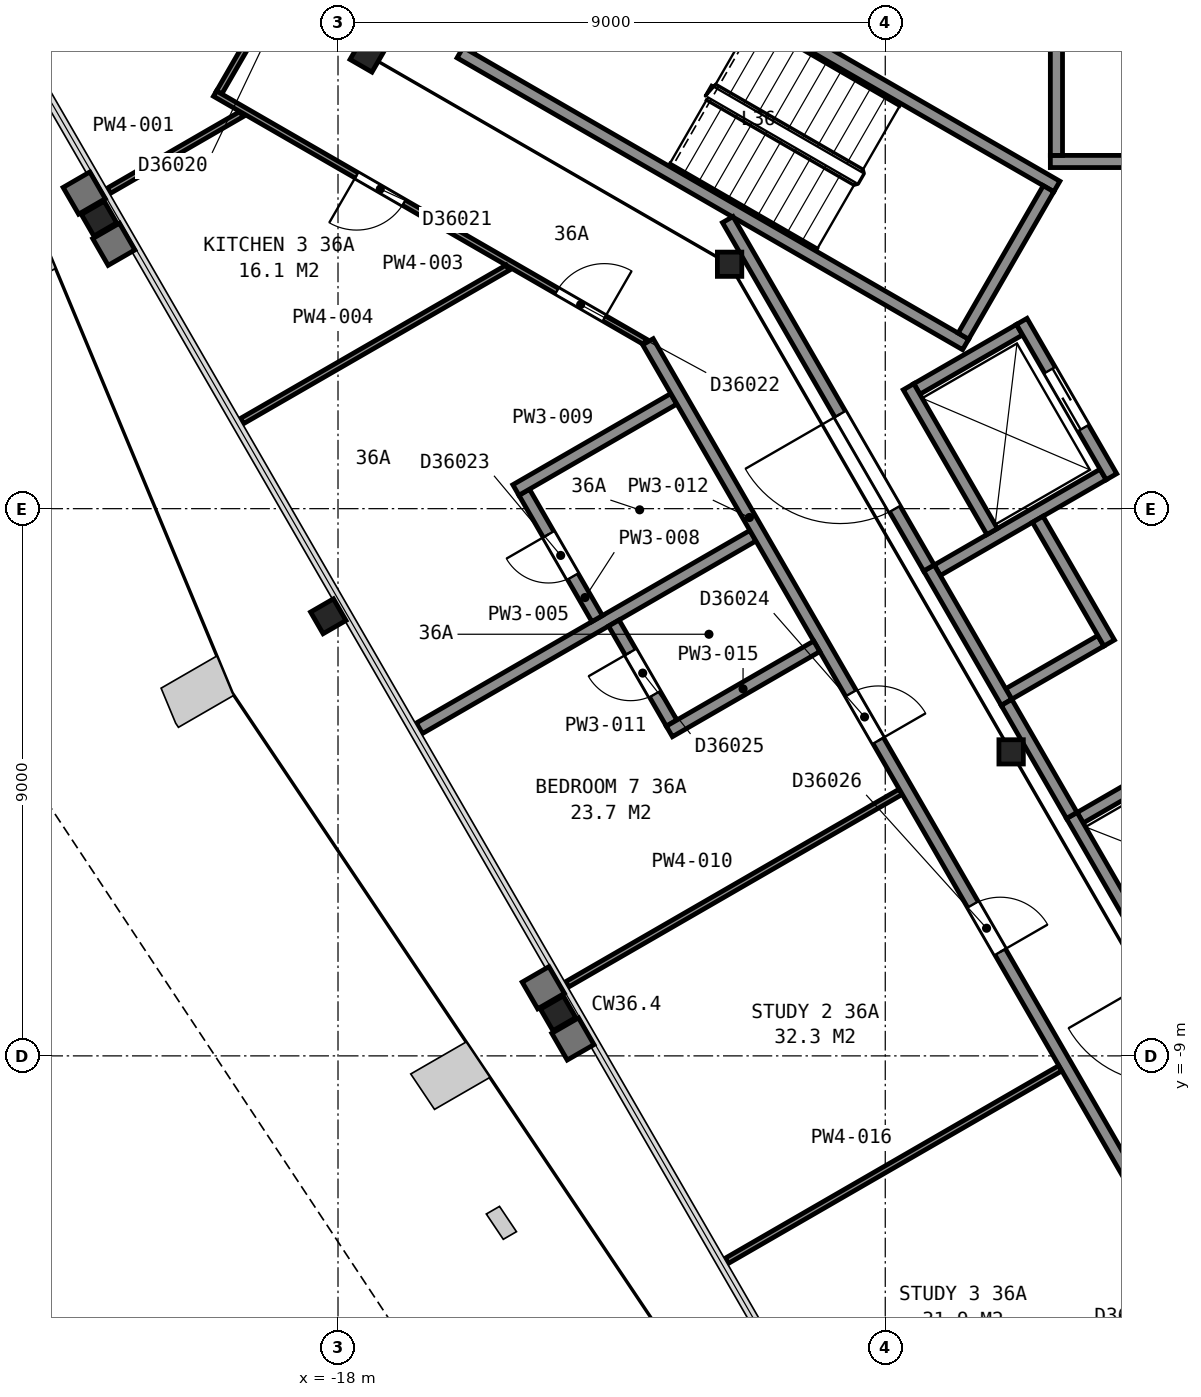
"""IFC4 building model, lengths in metres.
Left out: names, types, materials, properties, quantities, classifications, styles, units other than length and angle.
Written with IfcOpenShell. Run it as: python <this file> out.ifc"""

import sys

from ifc_helpers import new_model, si_unit, direction, frame, frame_2d, origin, origin_2d, place, context, subcontext, project, spatial, rectangle, i_section, extrude, element, fill, save


model = new_model("IFC4")
c1 = context("Model", 3, precision=1e-05, world=origin(), true_north=direction((0.0, 1.0)))
c2 = subcontext(c1, "Body", "Model", "MODEL_VIEW")
j1 = project(units=[si_unit("LENGTHUNIT", "METRE"), si_unit("PLANEANGLEUNIT", "RADIAN")], contexts=[c1])
p1 = place(None, origin())
s1 = spatial("IfcSite", under=j1, at=p1, CompositionType="ELEMENT")
p2 = place(p1, origin())
s2 = spatial("IfcBuilding", under=s1, at=p2, CompositionType="ELEMENT")
p3 = place(p2, frame((0.0, 0.0, 148.8)))
s3 = spatial("IfcBuildingStorey", under=s2, at=p3, CompositionType="ELEMENT", Elevation=148.8)
for number, where, z_axis, x_axis in (
    (1, (-21.93, 4.77, 0.0), (0.0, 0.0, 1.0), (-0.5, 0.866, 0.0)),
    (2, (-18.16, -1.77, 0.0), (0.0, 0.0, 1.0), (-0.5, 0.866, 0.0)),
    (3, (-14.38, -8.3, 0.0), (0.0, 0.0, 1.0), (-0.5, 0.866, 0.0)),
):
    element("IfcColumn", number, at=place(p3, frame(where, z_axis=z_axis, x_axis=x_axis)), inside=s3, PredefinedType="COLUMN", context=c2, shape_type="SweptSolid", body=[
        extrude(i_section(OverallWidth=0.411, OverallDepth=0.434, WebThickness=0.036, FlangeThickness=0.057, FilletRadius=0.015, at=origin_2d()), origin(), (0.0, 0.0, 1.0), 3.7),
    ])
p4 = place(p3, frame((-17.52, 7.46, 0.055), z_axis=(0.0, 0.0, 1.0), x_axis=(0.5, 0.866025403784, 0.0)))
e4 = element("IfcColumn", 4, at=p4, inside=s3, PredefinedType="COLUMN", context=c2, shape_type="SweptSolid", body=[
    extrude(i_section(OverallWidth=0.406, OverallDepth=0.417, WebThickness=0.03, FlangeThickness=0.048, FilletRadius=0.015, at=origin_2d()), origin(), (0.0, 0.0, 1.0), 3.645),
])
p5 = place(p3, frame((-11.56, 4.02, 0.065), z_axis=(0.0, 0.0, 1.0), x_axis=(1.0, 0.0, 0.0)))
e5 = element("IfcColumn", 5, at=p5, inside=s3, PredefinedType="COLUMN", context=c2, shape_type="SweptSolid", body=[
    extrude(i_section(OverallWidth=0.401, OverallDepth=0.399, WebThickness=0.025, FlangeThickness=0.04, FilletRadius=0.015, at=origin_2d()), origin(), (0.0, 0.0, 1.0), 3.635),
])
p6 = place(p3, frame((-6.93, -4.0, 0.04), z_axis=(0.0, 0.0, 1.0), x_axis=(1.0, 0.0, 0.0)))
e6 = element("IfcColumn", 6, at=p6, inside=s3, PredefinedType="COLUMN", context=c2, shape_type="SweptSolid", body=[
    extrude(i_section(OverallWidth=0.401, OverallDepth=0.399, WebThickness=0.025, FlangeThickness=0.04, FilletRadius=0.015, at=origin_2d()), origin(), (0.0, 0.0, 1.0), 3.66),
])
p7 = place(p3, frame((-14.455, 9.962, 0.0), z_axis=(0.0, 0.0, 1.0), x_axis=(-0.500049511043, -0.865996816683, 0.0)))
e7 = element("IfcWall", 7, at=p7, inside=s3, PredefinedType="PARTITIONING", context=c2, shape_type="SweptSolid", body=[
    extrude(rectangle(XDim=2.8, YDim=0.2, at=frame_2d((1.4, 0.0))), origin(), (0.0, 0.0, 1.0), 3.45),
])
p8 = place(p7, frame((0.85, 0.0, 0.0)))
e8 = element("IfcOpeningElement", 8, at=p8, cuts=e7, PredefinedType="OPENING", context=c2, shape_type="SweptSolid", body=[
    extrude(rectangle(XDim=1.1, YDim=2.1, at=frame_2d((0.55, 1.05))), frame((0.0, 0.11, 0.0), z_axis=(0.0, -1.0, 0.0), x_axis=(1.0, 0.0, 0.0)), (0.0, 0.0, 1.0), 0.22),
])
for number, where, z_axis, x_axis in (
    (9, (-7.678, 2.701, 0.0), (0.0, 0.0, 1.0), (-0.866, 0.5, 0.0)),
    (10, (-6.178, 5.299, 0.0), (0.0, 0.0, 1.0), (-0.866, 0.5, 0.0)),
):
    element("IfcWall", number, at=place(p3, frame(where, z_axis=z_axis, x_axis=x_axis)), inside=s3, PredefinedType="PARTITIONING", context=c2, shape_type="SweptSolid", body=[
        extrude(rectangle(XDim=9.6, YDim=0.2, at=frame_2d((4.8, 0.0))), origin(), (0.0, 0.0, 1.0), 3.45),
    ])
p9 = place(p3, frame((-6.315, 5.262, 0.0), z_axis=(0.0, 0.0, 1.0), x_axis=(-0.500049511043, -0.865996816683, 0.0)))
e11 = element("IfcWall", 11, at=p9, inside=s3, PredefinedType="PARTITIONING", context=c2, shape_type="SweptSolid", body=[
    extrude(rectangle(XDim=2.8, YDim=0.2, at=frame_2d((1.4, 0.0))), origin(), (0.0, 0.0, 1.0), 3.45),
])
p10 = place(p3, frame((-6.285, 5.71, 0.0), z_axis=(0.0, 0.0, 1.0), x_axis=(1.0, 0.0, 0.0)))
e12 = element("IfcWall", 12, at=p10, inside=s3, PredefinedType="PARTITIONING", context=c2, shape_type="SweptSolid", body=[
    extrude(rectangle(XDim=2.35, YDim=0.2, at=frame_2d((1.175, 0.0))), origin(), (0.0, 0.0, 1.0), 3.7),
])
for number, where, z_axis, x_axis in (
    (13, (-5.795, -5.083, 0.0), (0.0, 0.0, 1.0), (0.866, 0.5, 0.0)),
    (14, (-6.97, -3.048, 0.0), (0.0, 0.0, 1.0), (0.866, 0.5, 0.0)),
):
    element("IfcWall", number, at=place(p3, frame(where, z_axis=z_axis, x_axis=x_axis)), inside=s3, PredefinedType="PARTITIONING", context=c2, shape_type="SweptSolid", body=[
        extrude(rectangle(XDim=1.75, YDim=0.2, at=frame_2d((0.875, 0.0))), origin(), (0.0, 0.0, 1.0), 3.7),
    ])
p11 = place(p3, frame((-8.145, -1.013, 0.0), z_axis=(0.0, 0.0, 1.0), x_axis=(0.866016494683, 0.500015430699, 0.0)))
e15 = element("IfcWall", 15, at=p11, inside=s3, PredefinedType="PARTITIONING", context=c2, shape_type="SweptSolid", body=[
    extrude(rectangle(XDim=3.15, YDim=0.2, at=frame_2d((1.575, 0.0))), origin(), (0.0, 0.0, 1.0), 3.7),
])
p12 = place(p3, frame((-8.48, 1.969, 0.0), z_axis=(0.0, 0.0, 1.0), x_axis=(0.866000020948, 0.500043961785, 0.0)))
e16 = element("IfcWall", 16, at=p12, inside=s3, PredefinedType="PARTITIONING", context=c2, shape_type="SweptSolid", body=[
    extrude(rectangle(XDim=1.95, YDim=0.2, at=frame_2d((0.975, 0.0))), origin(), (0.0, 0.0, 1.0), 3.7),
])
p13 = place(p3, frame((-6.185, 5.81, 0.0), z_axis=(0.0, 0.0, 1.0), x_axis=(0.0, 1.0, 0.0)))
e17 = element("IfcWall", 17, at=p13, inside=s3, PredefinedType="PARTITIONING", context=c2, shape_type="SweptSolid", body=[
    extrude(rectangle(XDim=1.75, YDim=0.2, at=frame_2d((0.875, 0.0))), origin(), (0.0, 0.0, 1.0), 3.7),
])
p14 = place(p3, frame((-5.28, 0.525, 0.0), z_axis=(0.0, 0.0, 1.0), x_axis=(-0.500037662692, 0.866003658127, 0.0)))
e18 = element("IfcWall", 18, at=p14, inside=s3, PredefinedType="PARTITIONING", context=c2, shape_type="SweptSolid", body=[
    extrude(rectangle(XDim=2.95, YDim=0.2, at=frame_2d((1.475, 0.0))), origin(), (0.0, 0.0, 1.0), 3.7),
])
p15 = place(p14, frame((0.925, 0.0, 0.0)))
e19 = element("IfcOpeningElement", 19, at=p15, cuts=e18, PredefinedType="OPENING", context=c2, shape_type="SweptSolid", body=[
    extrude(rectangle(XDim=1.1, YDim=2.1, at=frame_2d((0.55, 1.05))), frame((0.0, 0.11, 0.0), z_axis=(0.0, -1.0, 0.0), x_axis=(1.0, 0.0, 0.0)), (0.0, 0.0, 1.0), 0.22),
])
p16 = place(p3, frame((-5.318, -2.21, 0.0), z_axis=(0.0, 0.0, 1.0), x_axis=(-0.499938297808, 0.866061024631, 0.0)))
e20 = element("IfcWall", 20, at=p16, inside=s3, PredefinedType="PARTITIONING", context=c2, shape_type="SweptSolid", body=[
    extrude(rectangle(XDim=2.35, YDim=0.2, at=frame_2d((1.175, 0.0))), origin(), (0.0, 0.0, 1.0), 3.7),
])
p17 = place(p3, frame((-7.242, -0.376, 0.0), z_axis=(0.0, 0.0, 1.0), x_axis=(-0.499996545922, 0.866027397988, 0.0)))
e21 = element("IfcWall", 21, at=p17, inside=s3, PredefinedType="PARTITIONING", context=c2, shape_type="SweptSolid", body=[
    extrude(rectangle(XDim=2.75, YDim=0.2, at=frame_2d((1.375, 0.0))), origin(), (0.0, 0.0, 1.0), 3.7),
])
for number, where, z_axis, x_axis in (
    (22, (-4.656, -7.255, 0.0), (0.0, 0.0, 1.0), (-0.5, 0.866, 0.0)),
    (23, (-7.006, -3.185, 0.0), (0.0, 0.0, 1.0), (-0.5, 0.866, 0.0)),
):
    element("IfcWall", number, at=place(p3, frame(where, z_axis=z_axis, x_axis=x_axis)), inside=s3, PredefinedType="PARTITIONING", context=c2, shape_type="SweptSolid", body=[
        extrude(rectangle(XDim=2.55, YDim=0.2, at=frame_2d((1.275, 0.0))), origin(), (0.0, 0.0, 1.0), 3.7),
    ])
p18 = place(p3, frame((-11.591, 4.755, 0.0), z_axis=(0.0, 0.0, 1.0), x_axis=(0.500043977787, -0.866000011708, 0.0)))
e24 = element("IfcWall", 24, at=p18, inside=s3, PredefinedType="PARTITIONING", context=c2, shape_type="SweptSolid", body=[
    extrude(rectangle(XDim=6.617, YDim=0.2, at=frame_2d((3.308, 0.0))), origin(), (0.0, 0.0, 1.0), 3.45),
])
p19 = place(p18, frame((3.695, 0.0, 0.0)))
e25 = element("IfcOpeningElement", 25, at=p19, cuts=e24, PredefinedType="OPENING", context=c2, shape_type="SweptSolid", body=[
    extrude(rectangle(XDim=1.8, YDim=2.1, at=frame_2d((0.9, 1.05))), frame((0.0, 0.11, 0.0), z_axis=(0.0, -1.0, 0.0), x_axis=(1.0, 0.0, 0.0)), (0.0, 0.0, 1.0), 0.22),
])
p20 = place(p3, frame((-7.005, -3.187, 0.0), z_axis=(0.0, 0.0, 1.0), x_axis=(0.499689606989, -0.866204535123, 0.0)))
e26 = element("IfcWall", 26, at=p20, inside=s3, PredefinedType="PARTITIONING", context=c2, shape_type="SweptSolid", body=[
    extrude(rectangle(XDim=2.145, YDim=0.2, at=frame_2d((1.072, 0.0))), origin(), (0.0, 0.0, 1.0), 3.45),
])
p21 = place(p3, frame((-21.767, 5.23, 0.0), z_axis=(0.0, 0.0, 1.0), x_axis=(0.865868809172, 0.50027113179, 0.0)))
e27 = element("IfcWall", 27, at=p21, inside=s3, PredefinedType="PARTITIONING", context=c2, shape_type="SweptSolid", body=[
    extrude(rectangle(XDim=2.516, YDim=0.1, at=frame_2d((1.258, 0.0))), origin(), (0.0, 0.0, 1.0), 2.713),
])
p22 = place(p3, frame((-19.955, 6.844, 0.0), z_axis=(0.0, 0.0, 1.0), x_axis=(0.500422653123, 0.865781247337, 0.0)))
e28 = element("IfcWall", 28, at=p22, inside=s3, PredefinedType="PARTITIONING", context=c2, shape_type="SweptSolid", body=[
    extrude(rectangle(XDim=8.047, YDim=0.1, at=frame_2d((4.024, 0.0))), origin(), (0.0, 0.0, 1.0), 2.713),
])
p23 = place(p22, frame((3.45, 0.0, 0.0)))
e29 = element("IfcOpeningElement", 29, at=p23, cuts=e28, PredefinedType="OPENING", context=c2, shape_type="SweptSolid", body=[
    extrude(rectangle(XDim=1.2, YDim=2.1, at=frame_2d((0.6, 1.05))), frame((0.0, 0.06, 0.0), z_axis=(0.0, -1.0, 0.0), x_axis=(1.0, 0.0, 0.0)), (0.0, 0.0, 1.0), 0.12),
])
p24 = place(p3, frame((-12.952, 2.744, 0.0), z_axis=(0.0, 0.0, 1.0), x_axis=(-0.86608949446, 0.499888975259, 0.0)))
e30 = element("IfcWall", 30, at=p24, inside=s3, PredefinedType="PARTITIONING", context=c2, shape_type="SweptSolid", body=[
    extrude(rectangle(XDim=8.165, YDim=0.1, at=frame_2d((4.083, 0.0))), origin(), (0.0, 0.0, 1.0), 2.713),
])
p25 = place(p24, frame((4.576, 0.0, 0.0)))
e31 = element("IfcOpeningElement", 31, at=p25, cuts=e30, PredefinedType="OPENING", context=c2, shape_type="SweptSolid", body=[
    extrude(rectangle(XDim=0.9, YDim=2.1, at=frame_2d((0.45, 1.05))), frame((0.0, 0.06, 0.0), z_axis=(0.0, -1.0, 0.0), x_axis=(1.0, 0.0, 0.0)), (0.0, 0.0, 1.0), 0.12),
])
p26 = place(p24, frame((0.772, 0.0, 0.0)))
e32 = element("IfcOpeningElement", 32, at=p26, cuts=e30, PredefinedType="OPENING", context=c2, shape_type="SweptSolid", body=[
    extrude(rectangle(XDim=0.9, YDim=2.1, at=frame_2d((0.45, 1.05))), frame((0.0, 0.06, 0.0), z_axis=(0.0, -1.0, 0.0), x_axis=(1.0, 0.0, 0.0)), (0.0, 0.0, 1.0), 0.12),
])
p27 = place(p3, frame((-19.579, 1.441, 0.0), z_axis=(0.0, 0.0, 1.0), x_axis=(0.866033235887, 0.499986434155, 0.0)))
e33 = element("IfcWall", 33, at=p27, inside=s3, PredefinedType="PARTITIONING", context=c2, shape_type="SweptSolid", body=[
    extrude(rectangle(XDim=5.044, YDim=0.1, at=frame_2d((2.522, 0.0))), origin(), (0.0, 0.0, 1.0), 2.713),
])
p28 = place(p3, frame((-16.662, -3.612, 0.0), z_axis=(0.0, 0.0, 1.0), x_axis=(0.866030886774, 0.499990503064, 0.0)))
e34 = element("IfcWall", 34, at=p28, inside=s3, PredefinedType="PARTITIONING", context=c2, shape_type="SweptSolid", body=[
    extrude(rectangle(XDim=6.333, YDim=0.2, at=frame_2d((3.167, 0.0))), origin(), (0.0, 0.0, 1.0), 2.713),
])
p29 = place(p3, frame((-14.938, 0.271, 0.0), z_axis=(0.0, 0.0, 1.0), x_axis=(0.499913221443, -0.866075499611, 0.0)))
e35 = element("IfcWall", 35, at=p29, inside=s3, PredefinedType="PARTITIONING", context=c2, shape_type="SweptSolid", body=[
    extrude(rectangle(XDim=2.4, YDim=0.2, at=frame_2d((1.2, 0.0))), origin(), (0.0, 0.0, 1.0), 2.713),
])
p30 = place(p29, frame((0.8, 0.0, 0.0)))
e36 = element("IfcOpeningElement", 36, at=p30, cuts=e35, PredefinedType="OPENING", context=c2, shape_type="SweptSolid", body=[
    extrude(rectangle(XDim=0.8, YDim=2.1, at=frame_2d((0.4, 1.05))), frame((0.0, 0.11, 0.0), z_axis=(0.0, -1.0, 0.0), x_axis=(1.0, 0.0, 0.0)), (0.0, 0.0, 1.0), 0.22),
])
p31 = place(p3, frame((-15.075, 0.307, 0.0), z_axis=(0.0, 0.0, 1.0), x_axis=(0.866134024916, 0.499811815469, 0.0)))
e37 = element("IfcWall", 37, at=p31, inside=s3, PredefinedType="PARTITIONING", context=c2, shape_type="SweptSolid", body=[
    extrude(rectangle(XDim=2.996, YDim=0.2, at=frame_2d((1.498, 0.0))), origin(), (0.0, 0.0, 1.0), 2.713),
])
p32 = place(p3, frame((-14.23, -7.823, 0.0), z_axis=(0.0, 0.0, 1.0), x_axis=(0.866021249958, 0.50000719457, 0.0)))
e38 = element("IfcWall", 38, at=p32, inside=s3, PredefinedType="PARTITIONING", context=c2, shape_type="SweptSolid", body=[
    extrude(rectangle(XDim=6.333, YDim=0.1, at=frame_2d((3.167, 0.0))), origin(), (0.0, 0.0, 1.0), 2.713),
])
p33 = place(p3, frame((-13.464, -1.882, 0.0), z_axis=(0.0, 0.0, 1.0), x_axis=(0.500007885066, -0.866020851292, 0.0)))
e39 = element("IfcWall", 39, at=p33, inside=s3, PredefinedType="PARTITIONING", context=c2, shape_type="SweptSolid", body=[
    extrude(rectangle(XDim=1.9, YDim=0.2, at=frame_2d((0.95, 0.0))), origin(), (0.0, 0.0, 1.0), 2.713),
])
p34 = place(p33, frame((0.55, 0.0, 0.0)))
e40 = element("IfcOpeningElement", 40, at=p34, cuts=e39, PredefinedType="OPENING", context=c2, shape_type="SweptSolid", body=[
    extrude(rectangle(XDim=0.8, YDim=2.1, at=frame_2d((0.4, 1.05))), frame((0.0, 0.11, 0.0), z_axis=(0.0, -1.0, 0.0), x_axis=(1.0, 0.0, 0.0)), (0.0, 0.0, 1.0), 0.22),
])
p35 = place(p3, frame((-4.075, -12.545, 0.0), z_axis=(0.0, 0.0, 1.0), x_axis=(-0.499999743747, 0.866025551732, 0.0)))
e41 = element("IfcWall", 41, at=p35, inside=s3, PredefinedType="PARTITIONING", context=c2, shape_type="SweptSolid", body=[
    extrude(rectangle(XDim=17.656, YDim=0.2, at=frame_2d((8.828, 0.0))), origin(), (0.0, 0.0, 1.0), 2.713),
])
p36 = place(p35, frame((10.08, 0.0, 0.0)))
e42 = element("IfcOpeningElement", 42, at=p36, cuts=e41, PredefinedType="OPENING", context=c2, shape_type="SweptSolid", body=[
    extrude(rectangle(XDim=0.9, YDim=2.1, at=frame_2d((0.45, 1.05))), frame((0.0, 0.11, 0.0), z_axis=(0.0, -1.0, 0.0), x_axis=(1.0, 0.0, 0.0)), (0.0, 0.0, 1.0), 0.22),
])
p37 = place(p35, frame((6.068, 0.0, 0.0)))
e43 = element("IfcOpeningElement", 43, at=p37, cuts=e41, PredefinedType="OPENING", context=c2, shape_type="SweptSolid", body=[
    extrude(rectangle(XDim=0.9, YDim=2.1, at=frame_2d((0.45, 1.05))), frame((0.0, 0.11, 0.0), z_axis=(0.0, -1.0, 0.0), x_axis=(1.0, 0.0, 0.0)), (0.0, 0.0, 1.0), 0.22),
])
p38 = place(p3, frame((-12.551, -3.664, 0.0), z_axis=(0.0, 0.0, 1.0), x_axis=(0.865909567298, 0.500200581029, 0.0)))
e44 = element("IfcWall", 44, at=p38, inside=s3, PredefinedType="PARTITIONING", context=c2, shape_type="SweptSolid", body=[
    extrude(rectangle(XDim=2.799, YDim=0.2, at=frame_2d((1.399, 0.0))), origin(), (0.0, 0.0, 1.0), 2.713),
])
p39 = place(p3, frame((-11.605, -12.37, 0.0), z_axis=(0.0, 0.0, 1.0), x_axis=(0.866017278078, 0.500014073873, 0.0)))
e45 = element("IfcWall", 45, at=p39, inside=s3, PredefinedType="PARTITIONING", context=c2, shape_type="SweptSolid", body=[
    extrude(rectangle(XDim=6.329, YDim=0.1, at=frame_2d((3.165, 0.0))), origin(), (0.0, 0.0, 1.0), 2.713),
])
p40 = place(p15, origin())
e46 = element("IfcDoor", 46, at=p40, inside=s3, OperationType="SLIDING_TO_LEFT", PredefinedType="DOOR", context=c2, shape_type="SweptSolid", body=[
    extrude(rectangle(XDim=1.1, YDim=2.1, at=frame_2d((0.55, 1.05))), frame((0.0, 0.025, 0.0), z_axis=(0.0, -1.0, 0.0), x_axis=(1.0, 0.0, 0.0)), (0.0, 0.0, 1.0), 0.05),
])
fill(e19, e46)
p41 = place(p19, origin())
e47 = element("IfcDoor", 47, at=p41, inside=s3, OperationType="DOUBLE_DOOR_SINGLE_SWING", PredefinedType="DOOR", context=c2, shape_type="SweptSolid", body=[
    extrude(rectangle(XDim=1.8, YDim=2.1, at=frame_2d((0.9, 1.05))), frame((0.0, 0.025, 0.0), z_axis=(0.0, -1.0, 0.0), x_axis=(1.0, 0.0, 0.0)), (0.0, 0.0, 1.0), 0.05),
])
fill(e25, e47)
p42 = place(p25, origin())
e48 = element("IfcDoor", 48, at=p42, inside=s3, OperationType="SINGLE_SWING_RIGHT", PredefinedType="DOOR", context=c2, shape_type="SweptSolid", body=[
    extrude(rectangle(XDim=0.9, YDim=2.1, at=frame_2d((0.45, 1.05))), frame((0.0, 0.025, 0.0), z_axis=(0.0, -1.0, 0.0), x_axis=(1.0, 0.0, 0.0)), (0.0, 0.0, 1.0), 0.05),
])
fill(e31, e48)
p43 = place(p26, origin())
e49 = element("IfcDoor", 49, at=p43, inside=s3, OperationType="SINGLE_SWING_LEFT", PredefinedType="DOOR", context=c2, shape_type="SweptSolid", body=[
    extrude(rectangle(XDim=0.9, YDim=2.1, at=frame_2d((0.45, 1.05))), frame((0.0, 0.025, 0.0), z_axis=(0.0, -1.0, 0.0), x_axis=(1.0, 0.0, 0.0)), (0.0, 0.0, 1.0), 0.05),
])
fill(e32, e49)
p44 = place(p30, origin())
e50 = element("IfcDoor", 50, at=p44, inside=s3, OperationType="SINGLE_SWING_LEFT", PredefinedType="DOOR", context=c2, shape_type="SweptSolid", body=[
    extrude(rectangle(XDim=0.8, YDim=2.1, at=frame_2d((0.4, 1.05))), frame((0.0, 0.025, 0.0), z_axis=(0.0, -1.0, 0.0), x_axis=(1.0, 0.0, 0.0)), (0.0, 0.0, 1.0), 0.05),
])
fill(e36, e50)
p45 = place(p34, origin())
e51 = element("IfcDoor", 51, at=p45, inside=s3, OperationType="SINGLE_SWING_LEFT", PredefinedType="DOOR", context=c2, shape_type="SweptSolid", body=[
    extrude(rectangle(XDim=0.8, YDim=2.1, at=frame_2d((0.4, 1.05))), frame((0.0, 0.025, 0.0), z_axis=(0.0, -1.0, 0.0), x_axis=(1.0, 0.0, 0.0)), (0.0, 0.0, 1.0), 0.05),
])
fill(e40, e51)
p46 = place(p36, origin())
e52 = element("IfcDoor", 52, at=p46, inside=s3, OperationType="SINGLE_SWING_LEFT", PredefinedType="DOOR", context=c2, shape_type="SweptSolid", body=[
    extrude(rectangle(XDim=0.9, YDim=2.1, at=frame_2d((0.45, 1.05))), frame((0.0, 0.025, 0.0), z_axis=(0.0, -1.0, 0.0), x_axis=(1.0, 0.0, 0.0)), (0.0, 0.0, 1.0), 0.05),
])
fill(e42, e52)
p47 = place(p37, origin())
e53 = element("IfcDoor", 53, at=p47, inside=s3, OperationType="SINGLE_SWING_LEFT", PredefinedType="DOOR", context=c2, shape_type="SweptSolid", body=[
    extrude(rectangle(XDim=0.9, YDim=2.1, at=frame_2d((0.45, 1.05))), frame((0.0, 0.025, 0.0), z_axis=(0.0, -1.0, 0.0), x_axis=(1.0, 0.0, 0.0)), (0.0, 0.0, 1.0), 0.05),
])
fill(e43, e53)
save(model, sys.argv[1])
